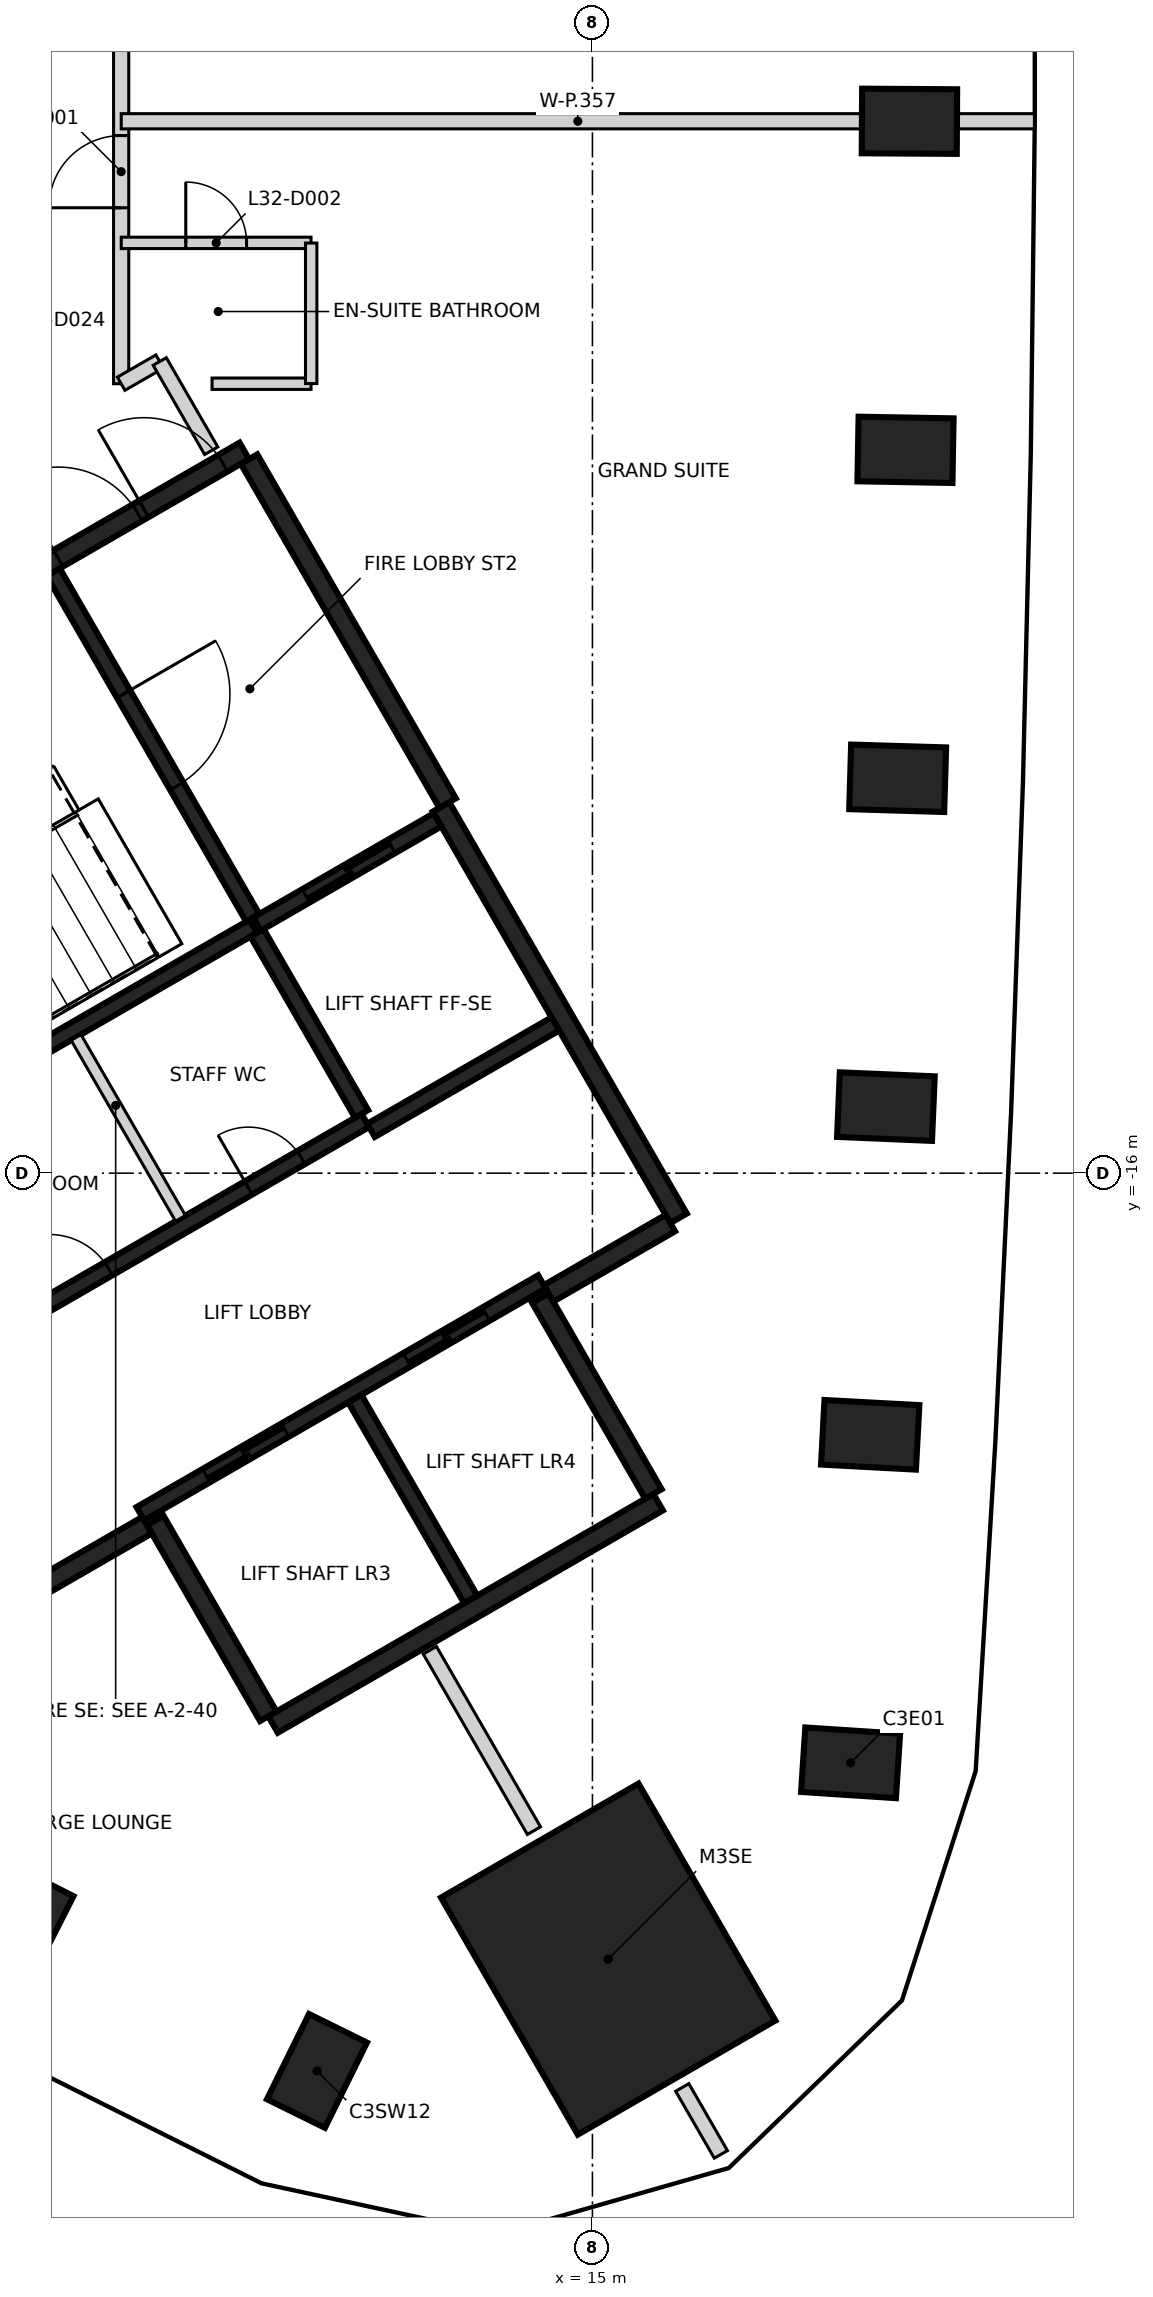
"""IFC4 building model, lengths in metres.
Left out: names, types, materials, properties, quantities, classifications, styles, units other than length and angle.
Written with IfcOpenShell. Run it as: python <this file> out.ifc"""

import sys

from ifc_helpers import new_model, si_unit, direction, frame, frame_2d, origin, origin_2d, place, context, subcontext, project, spatial, rectangle, extrude, element, fill, save


model = new_model("IFC4")
c1 = context("Model", 3, precision=1e-05, world=origin(), true_north=direction((0.0, 1.0)))
c2 = subcontext(c1, "Body", "Model", "MODEL_VIEW")
j1 = project(units=[si_unit("LENGTHUNIT", "METRE"), si_unit("PLANEANGLEUNIT", "RADIAN")], contexts=[c1])
p1 = place(None, origin())
s1 = spatial("IfcSite", under=j1, at=p1, CompositionType="ELEMENT")
p2 = place(p1, origin())
s2 = spatial("IfcBuilding", under=s1, at=p2, CompositionType="ELEMENT")
p3 = place(p2, frame((0.0, 0.0, 132.4)))
s3 = spatial("IfcBuildingStorey", under=s2, at=p3, CompositionType="ELEMENT", Elevation=132.4)
for number, where, z_axis, x_axis in (
    (1, (18.397, -23.757, -0.4), (0.0, 0.0, 1.0), (-0.998, 0.065, 0.0)),
    (2, (18.655, -19.442, -0.4), (0.0, 0.0, 1.0), (-0.999, 0.054, 0.0)),
    (3, (18.861, -15.124, -0.4), (0.0, 0.0, 1.0), (-0.999, 0.042, 0.0)),
    (4, (19.016, -10.805, -0.4), (0.0, 0.0, 1.0), (-1.0, 0.03, 0.0)),
    (5, (19.119, -6.484, -0.4), (0.0, 0.0, 1.0), (-1.0, 0.018, 0.0)),
    (6, (19.171, -2.161, -0.4), (0.0, 0.0, 1.0), (-1.0, 0.006, 0.0)),
    (7, (7.51, -25.876, -0.4), (0.0, 0.0, 1.0), (0.453, 0.892, 0.0)),
    (8, (11.376, -27.811, -0.4), (0.0, 0.0, 1.0), (0.442, 0.897, 0.0)),
):
    element("IfcColumn", number, at=place(p3, frame(where, z_axis=z_axis, x_axis=x_axis)), inside=s3, PredefinedType="COLUMN", context=c2, shape_type="SweptSolid", body=[
        extrude(rectangle(XDim=1.25, YDim=0.85, at=origin_2d()), origin(), (0.0, 0.0, 1.0), 3.6),
    ])
p4 = place(p3, frame((15.207, -26.34, -0.4), z_axis=(0.0, 0.0, 1.0), x_axis=(-0.5, 0.866025403784, 0.0)))
e9 = element("IfcColumn", 9, at=p4, inside=s3, PredefinedType="COLUMN", context=c2, shape_type="SweptSolid", body=[
    extrude(rectangle(XDim=3.6, YDim=3.0, at=origin_2d()), origin(), (0.0, 0.0, 1.0), 3.6),
])
p5 = place(p3, frame((0.417, -12.273, 0.0), z_axis=(0.0, 0.0, 1.0), x_axis=(0.866021906294, 0.500006057782, 0.0)))
e10 = element("IfcWall", 10, at=p5, inside=s3, PredefinedType="SHEAR", context=c2, shape_type="SweptSolid", body=[
    extrude(rectangle(XDim=11.55, YDim=0.25, at=frame_2d((5.775, 0.0))), origin(), (0.0, 0.0, 1.0), 3.2),
])
p6 = place(p5, frame((10.025, 0.0, 0.0)))
e11 = element("IfcOpeningElement", 11, at=p6, cuts=e10, PredefinedType="OPENING", context=c2, shape_type="SweptSolid", body=[
    extrude(rectangle(XDim=1.2, YDim=2.1, at=frame_2d((0.6, 1.05))), frame((0.0, 0.135, 0.0), z_axis=(0.0, -1.0, 0.0), x_axis=(1.0, 0.0, 0.0)), (0.0, 0.0, 1.0), 0.27),
])
p7 = place(p5, frame((8.725, 0.0, 0.0)))
e12 = element("IfcOpeningElement", 12, at=p7, cuts=e10, PredefinedType="OPENING", context=c2, shape_type="SweptSolid", body=[
    extrude(rectangle(XDim=1.2, YDim=2.1, at=frame_2d((0.6, 1.05))), frame((0.0, 0.135, 0.0), z_axis=(0.0, -1.0, 0.0), x_axis=(1.0, 0.0, 0.0)), (0.0, 0.0, 1.0), 0.27),
])
p8 = place(p3, frame((13.008, -11.181, 0.0), z_axis=(0.0, 0.0, 1.0), x_axis=(0.500004234368, -0.866022959057, 0.0)))
e13 = element("IfcWall", 13, at=p8, inside=s3, PredefinedType="SHEAR", context=c2, shape_type="SweptSolid", body=[
    extrude(rectangle(XDim=6.25, YDim=0.25, at=frame_2d((3.125, 0.0))), origin(), (0.0, 0.0, 1.0), 3.2),
])
p9 = place(p3, frame((15.865, -20.328, 0.0), z_axis=(0.0, 0.0, 1.0), x_axis=(-0.86602852612, -0.499994591916, 0.0)))
e14 = element("IfcWall", 14, at=p9, inside=s3, PredefinedType="SHEAR", context=c2, shape_type="SweptSolid", body=[
    extrude(rectangle(XDim=5.85, YDim=0.25, at=frame_2d((2.925, 0.0))), origin(), (0.0, 0.0, 1.0), 3.2),
])
p10 = place(p3, frame((10.483, -6.606, 0.0), z_axis=(0.0, 0.0, 1.0), x_axis=(0.49999885962, -0.866026062182, 0.0)))
e15 = element("IfcWall", 15, at=p10, inside=s3, PredefinedType="SHEAR", context=c2, shape_type="SweptSolid", body=[
    extrude(rectangle(XDim=5.225, YDim=0.25, at=frame_2d((2.612, 0.0))), origin(), (0.0, 0.0, 1.0), 3.2),
])
for number, where, z_axis, x_axis in (
    (16, (14.315, -17.644, 0.0), (0.0, 0.0, 1.0), (0.5, -0.866, 0.0)),
    (17, (10.736, -23.145, 0.0), (0.0, 0.0, 1.0), (-0.5, 0.866, 0.0)),
):
    element("IfcWall", number, at=place(p3, frame(where, z_axis=z_axis, x_axis=x_axis)), inside=s3, PredefinedType="SHEAR", context=c2, shape_type="SweptSolid", body=[
        extrude(rectangle(XDim=2.974, YDim=0.25, at=frame_2d((1.487, 0.0))), origin(), (0.0, 0.0, 1.0), 3.2),
    ])
p11 = place(p3, frame((9.14, -20.631, 0.0), z_axis=(0.0, 0.0, 1.0), x_axis=(-0.866043531843, -0.499968599967, 0.0)))
e18 = element("IfcWall", 18, at=p11, inside=s3, PredefinedType="SHEAR", context=c2, shape_type="SweptSolid", body=[
    extrude(rectangle(XDim=1.975, YDim=0.25, at=frame_2d((0.987, 0.0))), origin(), (0.0, 0.0, 1.0), 3.2),
])
p12 = place(p3, frame((16.025, -16.656, 0.0), z_axis=(0.0, 0.0, 1.0), x_axis=(-0.866016279763, -0.500015802937, 0.0)))
e19 = element("IfcWall", 19, at=p12, inside=s3, PredefinedType="SHEAR", context=c2, shape_type="SweptSolid", body=[
    extrude(rectangle(XDim=1.849, YDim=0.25, at=frame_2d((0.925, 0.0))), origin(), (0.0, 0.0, 1.0), 3.2),
])
p13 = place(p3, frame((9.052, -20.48, 0.0), z_axis=(0.0, 0.0, 1.0), x_axis=(0.866030299012, 0.499991521122, 0.0)))
e20 = element("IfcWall", 20, at=p13, inside=s3, PredefinedType="SHEAR", context=c2, shape_type="SweptSolid", body=[
    extrude(rectangle(XDim=6.1, YDim=0.2, at=frame_2d((3.05, 0.0))), origin(), (0.0, 0.0, 1.0), 3.2),
])
p14 = place(p13, frame((1.0, 0.0, 0.0)))
e21 = element("IfcOpeningElement", 21, at=p14, cuts=e20, PredefinedType="OPENING", context=c2, shape_type="SweptSolid", body=[
    extrude(rectangle(XDim=1.2, YDim=2.1, at=frame_2d((0.6, 1.05))), frame((0.0, 0.11, 0.0), z_axis=(0.0, -1.0, 0.0), x_axis=(1.0, 0.0, 0.0)), (0.0, 0.0, 1.0), 0.22),
])
p15 = place(p13, frame((4.05, 0.0, 0.0)))
e22 = element("IfcOpeningElement", 22, at=p15, cuts=e20, PredefinedType="OPENING", context=c2, shape_type="SweptSolid", body=[
    extrude(rectangle(XDim=1.2, YDim=2.1, at=frame_2d((0.6, 1.05))), frame((0.0, 0.11, 0.0), z_axis=(0.0, -1.0, 0.0), x_axis=(1.0, 0.0, 0.0)), (0.0, 0.0, 1.0), 0.22),
])
p16 = place(p3, frame((10.538, -12.752, 0.0), z_axis=(0.0, 0.0, 1.0), x_axis=(-0.866038630372, -0.499977090179, 0.0)))
e23 = element("IfcWall", 23, at=p16, inside=s3, PredefinedType="SHEAR", context=c2, shape_type="SweptSolid", body=[
    extrude(rectangle(XDim=5.699, YDim=0.2, at=frame_2d((2.85, 0.0))), origin(), (0.0, 0.0, 1.0), 3.2),
])
p17 = place(p3, frame((7.077, -18.156, 0.0), z_axis=(0.0, 0.0, 1.0), x_axis=(0.866038630372, 0.499977090179, 0.0)))
e24 = element("IfcWall", 24, at=p17, inside=s3, PredefinedType="SHEAR", context=c2, shape_type="SweptSolid", body=[
    extrude(rectangle(XDim=5.699, YDim=0.2, at=frame_2d((2.85, 0.0))), origin(), (0.0, 0.0, 1.0), 3.2),
])
p18 = place(p17, frame((0.899, 0.0, 0.0)))
e25 = element("IfcOpeningElement", 25, at=p18, cuts=e24, PredefinedType="OPENING", context=c2, shape_type="SweptSolid", body=[
    extrude(rectangle(XDim=0.9, YDim=2.1, at=frame_2d((0.45, 1.05))), frame((0.0, 0.11, 0.0), z_axis=(0.0, -1.0, 0.0), x_axis=(1.0, 0.0, 0.0)), (0.0, 0.0, 1.0), 0.22),
])
p19 = place(p17, frame((3.924, 0.0, 0.0)))
e26 = element("IfcOpeningElement", 26, at=p19, cuts=e24, PredefinedType="OPENING", context=c2, shape_type="SweptSolid", body=[
    extrude(rectangle(XDim=0.8, YDim=2.1, at=frame_2d((0.4, 1.05))), frame((0.0, 0.11, 0.0), z_axis=(0.0, -1.0, 0.0), x_axis=(1.0, 0.0, 0.0)), (0.0, 0.0, 1.0), 0.22),
])
p20 = place(p3, frame((7.906, -8.094, 0.0), z_axis=(0.0, 0.0, 1.0), x_axis=(0.500024287448, -0.866011380966, 0.0)))
e27 = element("IfcWall", 27, at=p20, inside=s3, PredefinedType="SHEAR", context=c2, shape_type="SweptSolid", body=[
    extrude(rectangle(XDim=5.251, YDim=0.2, at=frame_2d((2.625, 0.0))), origin(), (0.0, 0.0, 1.0), 3.2),
])
p21 = place(p20, frame((1.849, 0.0, 0.0)))
e28 = element("IfcOpeningElement", 28, at=p21, cuts=e27, PredefinedType="OPENING", context=c2, shape_type="SweptSolid", body=[
    extrude(rectangle(XDim=1.4, YDim=2.1, at=frame_2d((0.7, 1.05))), frame((0.0, 0.11, 0.0), z_axis=(0.0, -1.0, 0.0), x_axis=(1.0, 0.0, 0.0)), (0.0, 0.0, 1.0), 0.22),
])
p22 = place(p3, frame((11.875, -18.967, 0.0), z_axis=(0.0, 0.0, 1.0), x_axis=(0.49998131003, -0.866036194175, 0.0)))
e29 = element("IfcWall", 29, at=p22, inside=s3, PredefinedType="SHEAR", context=c2, shape_type="SweptSolid", body=[
    extrude(rectangle(XDim=3.048, YDim=0.2, at=frame_2d((1.524, 0.0))), origin(), (0.0, 0.0, 1.0), 3.2),
])
p23 = place(p3, frame((11.963, -15.22, 0.0), z_axis=(0.0, 0.0, 1.0), x_axis=(-0.500034990121, 0.866005201286, 0.0)))
e30 = element("IfcWall", 30, at=p23, inside=s3, PredefinedType="SHEAR", context=c2, shape_type="SweptSolid", body=[
    extrude(rectangle(XDim=2.75, YDim=0.2, at=frame_2d((1.375, 0.0))), origin(), (0.0, 0.0, 1.0), 3.2),
])
p24 = place(p3, frame((10.587, -12.723, 0.0), z_axis=(0.0, 0.0, 1.0), x_axis=(0.866037306777, 0.499979382845, 0.0)))
e31 = element("IfcWall", 31, at=p24, inside=s3, PredefinedType="SHEAR", context=c2, shape_type="SweptSolid", body=[
    extrude(rectangle(XDim=2.742, YDim=0.2, at=frame_2d((1.371, 0.0))), origin(), (0.0, 0.0, 1.0), 3.2),
])
p25 = place(p24, frame((0.743, 0.0, 0.0)))
e32 = element("IfcOpeningElement", 32, at=p25, cuts=e31, PredefinedType="OPENING", context=c2, shape_type="SweptSolid", body=[
    extrude(rectangle(XDim=1.3, YDim=2.1, at=frame_2d((0.65, 1.05))), frame((0.0, 0.11, 0.0), z_axis=(0.0, -1.0, 0.0), x_axis=(1.0, 0.0, 0.0)), (0.0, 0.0, 1.0), 0.22),
])
p26 = place(p3, frame((14.512, -14.037, 0.0), z_axis=(0.0, 0.0, 1.0), x_axis=(-0.866044696403, -0.499966582715, 0.0)))
e33 = element("IfcWall", 33, at=p26, inside=s3, PredefinedType="SHEAR", context=c2, shape_type="SweptSolid", body=[
    extrude(rectangle(XDim=2.799, YDim=0.2, at=frame_2d((1.399, 0.0))), origin(), (0.0, 0.0, 1.0), 3.2),
])
p27 = place(p3, frame((8.207, -14.214, 0.0), z_axis=(0.0, 0.0, 1.0), x_axis=(0.50002746344, -0.86600954718, 0.0)))
e34 = element("IfcWall", 34, at=p27, inside=s3, PredefinedType="PARTITIONING", context=c2, shape_type="SweptSolid", body=[
    extrude(rectangle(XDim=2.748, YDim=0.15, at=frame_2d((1.374, 0.0))), origin(), (0.0, 0.0, 1.0), 3.2),
])
p28 = place(p3, frame((8.8, -5.614, 0.0), z_axis=(0.0, 0.0, 1.0), x_axis=(0.0, 1.0, 0.0)))
e35 = element("IfcWall", 35, at=p28, inside=s3, PredefinedType="PARTITIONING", context=c2, shape_type="SweptSolid", body=[
    extrude(rectangle(XDim=9.692, YDim=0.2, at=frame_2d((4.846, 0.0))), origin(), (0.0, 0.0, 1.0), 3.2),
])
p29 = place(p28, frame((2.315, 0.0, 0.0)))
e36 = element("IfcOpeningElement", 36, at=p29, cuts=e35, PredefinedType="OPENING", context=c2, shape_type="SweptSolid", body=[
    extrude(rectangle(XDim=0.95, YDim=2.1, at=frame_2d((0.475, 1.05))), frame((0.0, 0.11, 0.0), z_axis=(0.0, -1.0, 0.0), x_axis=(1.0, 0.0, 0.0)), (0.0, 0.0, 1.0), 0.22),
])
p30 = place(p28, frame((5.114, 0.0, 0.0)))
e37 = element("IfcOpeningElement", 37, at=p30, cuts=e35, PredefinedType="OPENING", context=c2, shape_type="SweptSolid", body=[
    extrude(rectangle(XDim=1.0, YDim=2.1, at=frame_2d((0.5, 1.05))), frame((0.0, 0.11, 0.0), z_axis=(0.0, -1.0, 0.0), x_axis=(1.0, 0.0, 0.0)), (0.0, 0.0, 1.0), 0.22),
])
p31 = place(p3, frame((8.8, -5.614, 0.0), z_axis=(0.0, 0.0, 1.0), x_axis=(0.866491166515, 0.499192406143, 0.0)))
e38 = element("IfcWall", 38, at=p31, inside=s3, PredefinedType="PARTITIONING", context=c2, shape_type="SweptSolid", body=[
    extrude(rectangle(XDim=0.585, YDim=0.2, at=frame_2d((0.292, 0.0))), origin(), (0.0, 0.0, 1.0), 3.2),
])
p32 = place(p3, frame((9.308, -5.322, 0.0), z_axis=(0.0, 0.0, 1.0), x_axis=(0.499644515495, -0.866230545603, 0.0)))
e39 = element("IfcWall", 39, at=p32, inside=s3, PredefinedType="PARTITIONING", context=c2, shape_type="SweptSolid", body=[
    extrude(rectangle(XDim=1.356, YDim=0.2, at=frame_2d((0.678, 0.0))), origin(), (0.0, 0.0, 1.0), 3.2),
])
p33 = place(p3, frame((8.801, -2.161, 0.0), z_axis=(0.0, 0.0, 1.0), x_axis=(1.0, 0.0, 0.0)))
e40 = element("IfcWall", 40, at=p33, inside=s3, PredefinedType="PARTITIONING", context=c2, shape_type="SweptSolid", body=[
    extrude(rectangle(XDim=12.014, YDim=0.2, at=frame_2d((6.007, 0.0))), origin(), (0.0, 0.0, 1.0), 3.2),
])
p34 = place(p3, frame((12.861, -22.276, 0.0), z_axis=(0.0, 0.0, 1.0), x_axis=(0.49982784299, -0.866124775868, 0.0)))
e41 = element("IfcWall", 41, at=p34, inside=s3, PredefinedType="PARTITIONING", context=c2, shape_type="SweptSolid", body=[
    extrude(rectangle(XDim=2.741, YDim=0.2, at=frame_2d((1.37, 0.0))), origin(), (0.0, 0.0, 1.0), 3.2),
])
p35 = place(p3, frame((16.182, -28.028, 0.0), z_axis=(0.0, 0.0, 1.0), x_axis=(0.499625455419, -0.866241539236, 0.0)))
e42 = element("IfcWall", 42, at=p35, inside=s3, PredefinedType="PARTITIONING", context=c2, shape_type="SweptSolid", body=[
    extrude(rectangle(XDim=1.017, YDim=0.2, at=frame_2d((0.508, 0.0))), origin(), (0.0, 0.0, 1.0), 3.2),
])
p36 = place(p3, frame((8.801, -3.761, 0.0), z_axis=(0.0, 0.0, 1.0), x_axis=(1.0, 0.0, 0.0)))
e43 = element("IfcWall", 43, at=p36, inside=s3, PredefinedType="PARTITIONING", context=c2, shape_type="SweptSolid", body=[
    extrude(rectangle(XDim=2.497, YDim=0.15, at=frame_2d((1.249, 0.0))), origin(), (0.0, 0.0, 1.0), 3.2),
])
p37 = place(p36, frame((0.849, 0.0, 0.0)))
e44 = element("IfcOpeningElement", 44, at=p37, cuts=e43, PredefinedType="OPENING", context=c2, shape_type="SweptSolid", body=[
    extrude(rectangle(XDim=0.8, YDim=2.1, at=frame_2d((0.4, 1.05))), frame((0.0, 0.085, 0.0), z_axis=(0.0, -1.0, 0.0), x_axis=(1.0, 0.0, 0.0)), (0.0, 0.0, 1.0), 0.17),
])
p38 = place(p3, frame((11.298, -5.614, 0.0), z_axis=(0.0, 0.0, 1.0), x_axis=(-1.0, 0.0, 0.0)))
e45 = element("IfcWall", 45, at=p38, inside=s3, PredefinedType="PARTITIONING", context=c2, shape_type="SweptSolid", body=[
    extrude(rectangle(XDim=1.302, YDim=0.15, at=frame_2d((0.651, 0.0))), origin(), (0.0, 0.0, 1.0), 3.2),
])
p39 = place(p3, frame((11.3, -5.612, 0.0), z_axis=(0.0, 0.0, 1.0), x_axis=(0.0, 1.0, 0.0)))
e46 = element("IfcWall", 46, at=p39, inside=s3, PredefinedType="PARTITIONING", context=c2, shape_type="SweptSolid", body=[
    extrude(rectangle(XDim=1.849, YDim=0.15, at=frame_2d((0.925, 0.0))), origin(), (0.0, 0.0, 1.0), 3.2),
])
p40 = place(p25, origin())
e47 = element("IfcDoor", 47, at=p40, inside=s3, OperationType="SLIDING_TO_LEFT", PredefinedType="DOOR", context=c2, shape_type="SweptSolid", body=[
    extrude(rectangle(XDim=1.3, YDim=2.1, at=frame_2d((0.65, 1.05))), frame((0.0, 0.025, 0.0), z_axis=(0.0, -1.0, 0.0), x_axis=(1.0, 0.0, 0.0)), (0.0, 0.0, 1.0), 0.05),
])
fill(e32, e47)
p41 = place(p14, origin())
e48 = element("IfcDoor", 48, at=p41, inside=s3, OperationType="DOUBLE_DOOR_SLIDING", PredefinedType="DOOR", context=c2, shape_type="SweptSolid", body=[
    extrude(rectangle(XDim=1.2, YDim=2.1, at=frame_2d((0.6, 1.05))), frame((0.0, 0.025, 0.0), z_axis=(0.0, -1.0, 0.0), x_axis=(1.0, 0.0, 0.0)), (0.0, 0.0, 1.0), 0.05),
])
fill(e21, e48)
p42 = place(p15, origin())
e49 = element("IfcDoor", 49, at=p42, inside=s3, OperationType="DOUBLE_DOOR_SLIDING", PredefinedType="DOOR", context=c2, shape_type="SweptSolid", body=[
    extrude(rectangle(XDim=1.2, YDim=2.1, at=frame_2d((0.6, 1.05))), frame((0.0, 0.025, 0.0), z_axis=(0.0, -1.0, 0.0), x_axis=(1.0, 0.0, 0.0)), (0.0, 0.0, 1.0), 0.05),
])
fill(e22, e49)
p43 = place(p6, origin())
e50 = element("IfcDoor", 50, at=p43, inside=s3, OperationType="SINGLE_SWING_LEFT", PredefinedType="DOOR", context=c2, shape_type="SweptSolid", body=[
    extrude(rectangle(XDim=1.2, YDim=2.1, at=frame_2d((0.6, 1.05))), frame((0.0, 0.025, 0.0), z_axis=(0.0, -1.0, 0.0), x_axis=(1.0, 0.0, 0.0)), (0.0, 0.0, 1.0), 0.05),
])
fill(e11, e50)
p44 = place(p7, origin())
e51 = element("IfcDoor", 51, at=p44, inside=s3, OperationType="SINGLE_SWING_RIGHT", PredefinedType="DOOR", context=c2, shape_type="SweptSolid", body=[
    extrude(rectangle(XDim=1.2, YDim=2.1, at=frame_2d((0.6, 1.05))), frame((0.0, 0.025, 0.0), z_axis=(0.0, -1.0, 0.0), x_axis=(1.0, 0.0, 0.0)), (0.0, 0.0, 1.0), 0.05),
])
fill(e12, e51)
p45 = place(p21, origin())
e52 = element("IfcDoor", 52, at=p45, inside=s3, OperationType="SINGLE_SWING_LEFT", PredefinedType="DOOR", context=c2, shape_type="SweptSolid", body=[
    extrude(rectangle(XDim=1.4, YDim=2.1, at=frame_2d((0.7, 1.05))), frame((0.0, 0.025, 0.0), z_axis=(0.0, -1.0, 0.0), x_axis=(1.0, 0.0, 0.0)), (0.0, 0.0, 1.0), 0.05),
])
fill(e28, e52)
p46 = place(p18, origin())
e53 = element("IfcDoor", 53, at=p46, inside=s3, OperationType="SINGLE_SWING_RIGHT", PredefinedType="DOOR", context=c2, shape_type="SweptSolid", body=[
    extrude(rectangle(XDim=0.9, YDim=2.1, at=frame_2d((0.45, 1.05))), frame((0.0, 0.025, 0.0), z_axis=(0.0, -1.0, 0.0), x_axis=(1.0, 0.0, 0.0)), (0.0, 0.0, 1.0), 0.05),
])
fill(e25, e53)
p47 = place(p19, origin())
e54 = element("IfcDoor", 54, at=p47, inside=s3, OperationType="SINGLE_SWING_LEFT", PredefinedType="DOOR", context=c2, shape_type="SweptSolid", body=[
    extrude(rectangle(XDim=0.8, YDim=2.1, at=frame_2d((0.4, 1.05))), frame((0.0, 0.025, 0.0), z_axis=(0.0, -1.0, 0.0), x_axis=(1.0, 0.0, 0.0)), (0.0, 0.0, 1.0), 0.05),
])
fill(e26, e54)
p48 = place(p29, frame((0.95, 0.0, 0.0), z_axis=(0.0, 0.0, 1.0), x_axis=(-1.0, 0.0, 0.0)))
e55 = element("IfcDoor", 55, at=p48, inside=s3, OperationType="SINGLE_SWING_LEFT", PredefinedType="DOOR", context=c2, shape_type="SweptSolid", body=[
    extrude(rectangle(XDim=0.95, YDim=2.1, at=frame_2d((0.475, 1.05))), frame((0.0, 0.025, 0.0), z_axis=(0.0, -1.0, 0.0), x_axis=(1.0, 0.0, 0.0)), (0.0, 0.0, 1.0), 0.05),
])
fill(e36, e55)
p49 = place(p37, frame((0.8, 0.0, 0.0), z_axis=(0.0, 0.0, 1.0), x_axis=(-1.0, 0.0, 0.0)))
e56 = element("IfcDoor", 56, at=p49, inside=s3, OperationType="SINGLE_SWING_LEFT", PredefinedType="DOOR", context=c2, shape_type="SweptSolid", body=[
    extrude(rectangle(XDim=0.8, YDim=2.1, at=frame_2d((0.4, 1.05))), frame((0.0, 0.025, 0.0), z_axis=(0.0, -1.0, 0.0), x_axis=(1.0, 0.0, 0.0)), (0.0, 0.0, 1.0), 0.05),
])
fill(e44, e56)
save(model, sys.argv[1])
